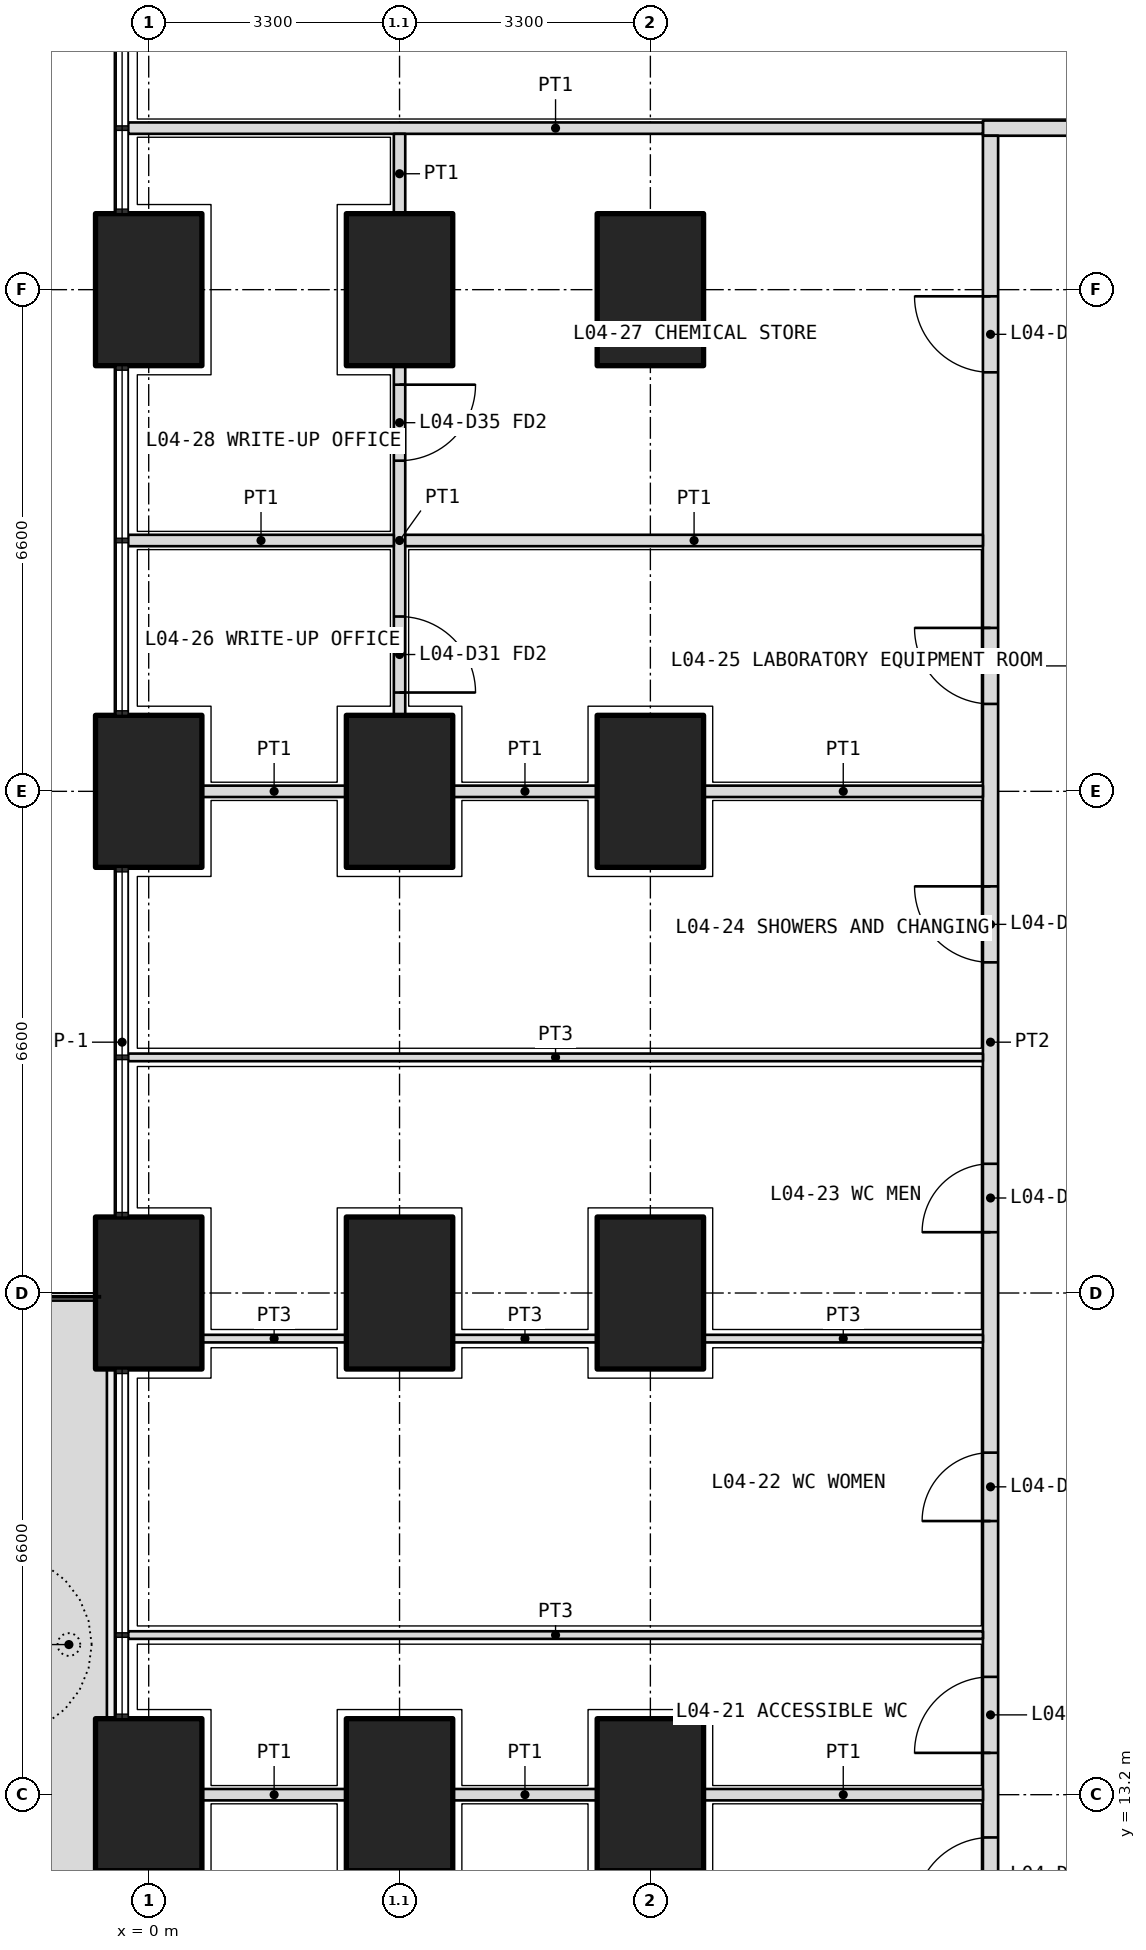
"""IFC4 building model, lengths in metres.
Left out: names, types, materials, properties, quantities, classifications, styles, units other than length and angle.
Written with IfcOpenShell. Run it as: python <this file> out.ifc"""

import sys

from ifc_helpers import new_model, si_unit, direction, frame, frame_2d, origin, origin_2d, place, context, subcontext, project, spatial, polyline, rectangle, outline, extrude, element, fill, save


model = new_model("IFC4")
c1 = context("Model", 3, precision=1e-05, world=origin(), true_north=direction((0.0, 1.0)))
c2 = subcontext(c1, "Body", "Model", "MODEL_VIEW")
j1 = project(units=[si_unit("LENGTHUNIT", "METRE"), si_unit("PLANEANGLEUNIT", "RADIAN")], contexts=[c1])
p1 = place(None, origin())
s1 = spatial("IfcSite", under=j1, at=p1, CompositionType="ELEMENT")
p2 = place(p1, origin())
s2 = spatial("IfcBuilding", under=s1, at=p2, CompositionType="ELEMENT")
p3 = place(p2, frame((0.0, 0.0, 21.3)))
s3 = spatial("IfcBuildingStorey", under=s2, at=p3, CompositionType="ELEMENT", Elevation=21.3)
for number, where, z_axis, x_axis in (
    (1, (0.0, 13.2, 0.0), (0.0, 0.0, 1.0), (0.0, 1.0, 0.0)),
    (2, (0.0, 19.8, 0.0), (0.0, 0.0, 1.0), (0.0, 1.0, 0.0)),
    (3, (0.0, 26.4, 0.0), (0.0, 0.0, 1.0), (0.0, 1.0, 0.0)),
    (4, (0.0, 33.0, 0.0), (0.0, 0.0, 1.0), (0.0, 1.0, 0.0)),
    (5, (3.3, 13.2, 0.0), (0.0, 0.0, 1.0), (0.0, 1.0, 0.0)),
    (6, (3.3, 19.8, 0.0), (0.0, 0.0, 1.0), (0.0, 1.0, 0.0)),
    (7, (3.3, 26.4, 0.0), (0.0, 0.0, 1.0), (0.0, 1.0, 0.0)),
    (8, (3.3, 33.0, 0.0), (0.0, 0.0, 1.0), (0.0, 1.0, 0.0)),
    (9, (6.6, 13.2, 0.0), (0.0, 0.0, 1.0), (0.0, 1.0, 0.0)),
    (10, (6.6, 19.8, 0.0), (0.0, 0.0, 1.0), (0.0, 1.0, 0.0)),
    (11, (6.6, 26.4, 0.0), (0.0, 0.0, 1.0), (0.0, 1.0, 0.0)),
    (12, (6.6, 33.0, 0.0), (0.0, 0.0, 1.0), (0.0, 1.0, 0.0)),
):
    element("IfcColumn", number, at=place(p3, frame(where, z_axis=z_axis, x_axis=x_axis)), inside=s3, PredefinedType="COLUMN", context=c2, shape_type="SweptSolid", body=[
        extrude(rectangle(XDim=2.0, YDim=1.4, at=origin_2d()), origin(), (0.0, 0.0, 1.0), 4.2),
    ])
p4 = place(p3, origin())
e13 = element("IfcWall", 13, at=p4, inside=s3, PredefinedType="USERDEFINED", context=c2, shape_type="SweptSolid", body=[
    extrude(outline(polyline([(-1.55, 10.65), (-0.55, 10.65), (-0.55, 19.7), (-1.55, 19.7), (-1.55, 10.65)]), holes=[polyline([(-1.4, 10.8), (-0.7, 10.8), (-0.7, 19.55), (-1.4, 19.55), (-1.4, 10.8)])]), origin(), (0.0, 0.0, 1.0), 1.05),
])
p5 = place(p3, frame((-0.35, 12.2, 0.0), z_axis=(0.0, 0.0, 1.0), x_axis=(0.0, -1.0, 0.0)))
e14 = element("IfcWall", 14, at=p5, inside=s3, PredefinedType="SOLIDWALL", context=c2, shape_type="SweptSolid", body=[
    extrude(rectangle(XDim=4.6, YDim=0.15, at=frame_2d((2.3, 0.0))), origin(), (0.0, 0.0, 1.0), 2.7),
])
p6 = place(p5, frame((1.05, 0.0, 0.0)))
e15 = element("IfcOpeningElement", 15, at=p6, cuts=e14, PredefinedType="OPENING", context=c2, shape_type="SweptSolid", body=[
    extrude(rectangle(XDim=1.0, YDim=2.4, at=frame_2d((0.5, 1.2))), frame((0.0, 0.085, 0.0), z_axis=(0.0, -1.0, 0.0), x_axis=(1.0, 0.0, 0.0)), (0.0, 0.0, 1.0), 0.17),
])
p7 = place(p5, frame((0.1, 0.0, 0.1)))
e16 = element("IfcOpeningElement", 16, at=p7, cuts=e14, PredefinedType="OPENING", context=c2, shape_type="SweptSolid", body=[
    extrude(rectangle(XDim=0.85, YDim=2.3, at=frame_2d((0.425, 1.15))), frame((0.0, 0.085, 0.0), z_axis=(0.0, -1.0, 0.0), x_axis=(1.0, 0.0, 0.0)), (0.0, 0.0, 1.0), 0.17),
])
p8 = place(p5, frame((2.55, 0.0, 0.1)))
e17 = element("IfcOpeningElement", 17, at=p8, cuts=e14, PredefinedType="OPENING", context=c2, shape_type="SweptSolid", body=[
    extrude(rectangle(XDim=1.95, YDim=2.3, at=frame_2d((0.975, 1.15))), frame((0.0, 0.085, 0.0), z_axis=(0.0, -1.0, 0.0), x_axis=(1.0, 0.0, 0.0)), (0.0, 0.0, 1.0), 0.17),
])
p9 = place(p3, frame((10.975, 35.125, 0.0), z_axis=(0.0, 0.0, 1.0), x_axis=(1.0, 0.0, 0.0)))
e18 = element("IfcWall", 18, at=p9, inside=s3, PredefinedType="PARTITIONING", context=c2, shape_type="SweptSolid", body=[
    extrude(rectangle(XDim=30.85, YDim=0.2, at=frame_2d((15.425, 0.0))), origin(), (0.0, 0.0, 1.0), 2.85),
])
p10 = place(p9, frame((7.262, 0.0, 0.0)))
e19 = element("IfcOpeningElement", 19, at=p10, cuts=e18, PredefinedType="OPENING", context=c2, shape_type="SweptSolid", body=[
    extrude(rectangle(XDim=1.0, YDim=2.1, at=frame_2d((0.5, 1.05))), frame((0.0, 0.11, 0.0), z_axis=(0.0, -1.0, 0.0), x_axis=(1.0, 0.0, 0.0)), (0.0, 0.0, 1.0), 0.22),
])
p11 = place(p9, frame((22.587, 0.0, 0.0)))
e20 = element("IfcOpeningElement", 20, at=p11, cuts=e18, PredefinedType="OPENING", context=c2, shape_type="SweptSolid", body=[
    extrude(rectangle(XDim=1.0, YDim=2.1, at=frame_2d((0.5, 1.05))), frame((0.0, 0.11, 0.0), z_axis=(0.0, -1.0, 0.0), x_axis=(1.0, 0.0, 0.0)), (0.0, 0.0, 1.0), 0.22),
])
p12 = place(p3, frame((11.075, 11.175, 0.0), z_axis=(0.0, 0.0, 1.0), x_axis=(0.0, 1.0, 0.0)))
e21 = element("IfcWall", 21, at=p12, inside=s3, PredefinedType="PARTITIONING", context=c2, shape_type="SweptSolid", body=[
    extrude(rectangle(XDim=23.85, YDim=0.2, at=frame_2d((11.925, 0.0))), origin(), (0.0, 0.0, 1.0), 2.85),
])
p13 = place(p12, frame((0.462, 0.0, 0.0)))
e22 = element("IfcOpeningElement", 22, at=p13, cuts=e21, PredefinedType="OPENING", context=c2, shape_type="SweptSolid", body=[
    extrude(rectangle(XDim=1.0, YDim=2.1, at=frame_2d((0.5, 1.05))), frame((0.0, 0.11, 0.0), z_axis=(0.0, -1.0, 0.0), x_axis=(1.0, 0.0, 0.0)), (0.0, 0.0, 1.0), 0.22),
])
p14 = place(p12, frame((2.575, 0.0, 0.0)))
e23 = element("IfcOpeningElement", 23, at=p14, cuts=e21, PredefinedType="OPENING", context=c2, shape_type="SweptSolid", body=[
    extrude(rectangle(XDim=1.0, YDim=2.1, at=frame_2d((0.5, 1.05))), frame((0.0, 0.11, 0.0), z_axis=(0.0, -1.0, 0.0), x_axis=(1.0, 0.0, 0.0)), (0.0, 0.0, 1.0), 0.22),
])
p15 = place(p12, frame((5.625, 0.0, 0.0)))
e24 = element("IfcOpeningElement", 24, at=p15, cuts=e21, PredefinedType="OPENING", context=c2, shape_type="SweptSolid", body=[
    extrude(rectangle(XDim=0.9, YDim=2.1, at=frame_2d((0.45, 1.05))), frame((0.0, 0.11, 0.0), z_axis=(0.0, -1.0, 0.0), x_axis=(1.0, 0.0, 0.0)), (0.0, 0.0, 1.0), 0.22),
])
p16 = place(p12, frame((9.425, 0.0, 0.0)))
e25 = element("IfcOpeningElement", 25, at=p16, cuts=e21, PredefinedType="OPENING", context=c2, shape_type="SweptSolid", body=[
    extrude(rectangle(XDim=0.9, YDim=2.1, at=frame_2d((0.45, 1.05))), frame((0.0, 0.11, 0.0), z_axis=(0.0, -1.0, 0.0), x_axis=(1.0, 0.0, 0.0)), (0.0, 0.0, 1.0), 0.22),
])
p17 = place(p12, frame((12.975, 0.0, 0.0)))
e26 = element("IfcOpeningElement", 26, at=p17, cuts=e21, PredefinedType="OPENING", context=c2, shape_type="SweptSolid", body=[
    extrude(rectangle(XDim=1.0, YDim=2.1, at=frame_2d((0.5, 1.05))), frame((0.0, 0.11, 0.0), z_axis=(0.0, -1.0, 0.0), x_axis=(1.0, 0.0, 0.0)), (0.0, 0.0, 1.0), 0.22),
])
p18 = place(p12, frame((16.375, 0.0, 0.0)))
e27 = element("IfcOpeningElement", 27, at=p18, cuts=e21, PredefinedType="OPENING", context=c2, shape_type="SweptSolid", body=[
    extrude(rectangle(XDim=1.0, YDim=2.1, at=frame_2d((0.5, 1.05))), frame((0.0, 0.11, 0.0), z_axis=(0.0, -1.0, 0.0), x_axis=(1.0, 0.0, 0.0)), (0.0, 0.0, 1.0), 0.22),
])
p19 = place(p12, frame((20.738, 0.0, 0.0)))
e28 = element("IfcOpeningElement", 28, at=p19, cuts=e21, PredefinedType="OPENING", context=c2, shape_type="SweptSolid", body=[
    extrude(rectangle(XDim=1.0, YDim=2.1, at=frame_2d((0.5, 1.05))), frame((0.0, 0.11, 0.0), z_axis=(0.0, -1.0, 0.0), x_axis=(1.0, 0.0, 0.0)), (0.0, 0.0, 1.0), 0.22),
])
p20 = place(p3, frame((-0.27, 35.125, 0.0), z_axis=(0.0, 0.0, 1.0), x_axis=(1.0, 0.0, 0.0)))
e29 = element("IfcWall", 29, at=p20, inside=s3, PredefinedType="PARTITIONING", context=c2, shape_type="SweptSolid", body=[
    extrude(rectangle(XDim=11.245, YDim=0.15, at=frame_2d((5.623, 0.0))), origin(), (0.0, 0.0, 1.0), 2.7),
])
p21 = place(p3, frame((3.3, 35.05, 0.0), z_axis=(0.0, 0.0, 1.0), x_axis=(0.0, -1.0, 0.0)))
e30 = element("IfcWall", 30, at=p21, inside=s3, PredefinedType="PARTITIONING", context=c2, shape_type="SweptSolid", body=[
    extrude(rectangle(XDim=1.05, YDim=0.15, at=frame_2d((0.525, 0.0))), origin(), (0.0, 0.0, 1.0), 3.9),
])
p22 = place(p3, frame((3.3, 32.0, 0.0), z_axis=(0.0, 0.0, 1.0), x_axis=(0.0, -1.0, 0.0)))
e31 = element("IfcWall", 31, at=p22, inside=s3, PredefinedType="PARTITIONING", context=c2, shape_type="SweptSolid", body=[
    extrude(rectangle(XDim=4.6, YDim=0.15, at=frame_2d((2.3, 0.0))), origin(), (0.0, 0.0, 1.0), 3.9),
])
p23 = place(p22, frame((3.3, 0.0, 0.0)))
e32 = element("IfcOpeningElement", 32, at=p23, cuts=e31, PredefinedType="OPENING", context=c2, shape_type="SweptSolid", body=[
    extrude(rectangle(XDim=1.0, YDim=2.1, at=frame_2d((0.5, 1.05))), frame((0.0, 0.085, 0.0), z_axis=(0.0, -1.0, 0.0), x_axis=(1.0, 0.0, 0.0)), (0.0, 0.0, 1.0), 0.17),
])
p24 = place(p22, frame((0.25, 0.0, 0.0)))
e33 = element("IfcOpeningElement", 33, at=p24, cuts=e31, PredefinedType="OPENING", context=c2, shape_type="SweptSolid", body=[
    extrude(rectangle(XDim=1.0, YDim=2.1, at=frame_2d((0.5, 1.05))), frame((0.0, 0.085, 0.0), z_axis=(0.0, -1.0, 0.0), x_axis=(1.0, 0.0, 0.0)), (0.0, 0.0, 1.0), 0.17),
])
p25 = place(p3, frame((3.3, 12.2, 0.0), z_axis=(0.0, 0.0, 1.0), x_axis=(0.0, -1.0, 0.0)))
e34 = element("IfcWall", 34, at=p25, inside=s3, PredefinedType="PARTITIONING", context=c2, shape_type="SweptSolid", body=[
    extrude(rectangle(XDim=4.6, YDim=0.15, at=frame_2d((2.3, 0.0))), origin(), (0.0, 0.0, 1.0), 3.9),
])
p26 = place(p25, frame((3.35, 0.0, 0.0)))
e35 = element("IfcOpeningElement", 35, at=p26, cuts=e34, PredefinedType="OPENING", context=c2, shape_type="SweptSolid", body=[
    extrude(rectangle(XDim=1.0, YDim=2.1, at=frame_2d((0.5, 1.05))), frame((0.0, 0.085, 0.0), z_axis=(0.0, -1.0, 0.0), x_axis=(1.0, 0.0, 0.0)), (0.0, 0.0, 1.0), 0.17),
])
p27 = place(p3, frame((-0.27, 15.3, 0.0), z_axis=(0.0, 0.0, 1.0), x_axis=(1.0, 0.0, 0.0)))
e36 = element("IfcWall", 36, at=p27, inside=s3, PredefinedType="PARTITIONING", context=c2, shape_type="SweptSolid", body=[
    extrude(rectangle(XDim=11.245, YDim=0.1, at=frame_2d((5.623, 0.0))), origin(), (0.0, 0.0, 1.0), 2.7),
])
p28 = place(p3, frame((0.7, 19.2, 0.0), z_axis=(0.0, 0.0, 1.0), x_axis=(1.0, 0.0, 0.0)))
e37 = element("IfcWall", 37, at=p28, inside=s3, PredefinedType="PARTITIONING", context=c2, shape_type="SweptSolid", body=[
    extrude(rectangle(XDim=1.9, YDim=0.1, at=frame_2d((0.95, 0.0))), origin(), (0.0, 0.0, 1.0), 2.85),
])
p29 = place(p3, frame((4.0, 19.2, 0.0), z_axis=(0.0, 0.0, 1.0), x_axis=(1.0, 0.0, 0.0)))
e38 = element("IfcWall", 38, at=p29, inside=s3, PredefinedType="PARTITIONING", context=c2, shape_type="SweptSolid", body=[
    extrude(rectangle(XDim=1.9, YDim=0.1, at=frame_2d((0.95, 0.0))), origin(), (0.0, 0.0, 1.0), 2.85),
])
p30 = place(p3, frame((7.3, 19.2, 0.0), z_axis=(0.0, 0.0, 1.0), x_axis=(1.0, 0.0, 0.0)))
e39 = element("IfcWall", 39, at=p30, inside=s3, PredefinedType="PARTITIONING", context=c2, shape_type="SweptSolid", body=[
    extrude(rectangle(XDim=3.675, YDim=0.1, at=frame_2d((1.837, 0.0))), origin(), (0.0, 0.0, 1.0), 2.85),
])
p31 = place(p3, frame((-0.27, 22.9, 0.0), z_axis=(0.0, 0.0, 1.0), x_axis=(1.0, 0.0, 0.0)))
e40 = element("IfcWall", 40, at=p31, inside=s3, PredefinedType="PARTITIONING", context=c2, shape_type="SweptSolid", body=[
    extrude(rectangle(XDim=11.245, YDim=0.1, at=frame_2d((5.623, 0.0))), origin(), (0.0, 0.0, 1.0), 2.7),
])
p32 = place(p3, frame((0.7, 13.2, 0.0), z_axis=(0.0, 0.0, 1.0), x_axis=(1.0, 0.0, 0.0)))
e41 = element("IfcWall", 41, at=p32, inside=s3, PredefinedType="PARTITIONING", context=c2, shape_type="SweptSolid", body=[
    extrude(rectangle(XDim=1.9, YDim=0.15, at=frame_2d((0.95, 0.0))), origin(), (0.0, 0.0, 1.0), 2.85),
])
p33 = place(p3, frame((4.0, 13.2, 0.0), z_axis=(0.0, 0.0, 1.0), x_axis=(1.0, 0.0, 0.0)))
e42 = element("IfcWall", 42, at=p33, inside=s3, PredefinedType="PARTITIONING", context=c2, shape_type="SweptSolid", body=[
    extrude(rectangle(XDim=1.9, YDim=0.15, at=frame_2d((0.95, 0.0))), origin(), (0.0, 0.0, 1.0), 2.85),
])
p34 = place(p3, frame((7.3, 13.2, 0.0), z_axis=(0.0, 0.0, 1.0), x_axis=(1.0, 0.0, 0.0)))
e43 = element("IfcWall", 43, at=p34, inside=s3, PredefinedType="PARTITIONING", context=c2, shape_type="SweptSolid", body=[
    extrude(rectangle(XDim=3.675, YDim=0.15, at=frame_2d((1.837, 0.0))), origin(), (0.0, 0.0, 1.0), 2.85),
])
p35 = place(p3, frame((0.7, 26.4, 0.0), z_axis=(0.0, 0.0, 1.0), x_axis=(1.0, 0.0, 0.0)))
e44 = element("IfcWall", 44, at=p35, inside=s3, PredefinedType="PARTITIONING", context=c2, shape_type="SweptSolid", body=[
    extrude(rectangle(XDim=1.9, YDim=0.15, at=frame_2d((0.95, 0.0))), origin(), (0.0, 0.0, 1.0), 2.85),
])
p36 = place(p3, frame((4.0, 26.4, 0.0), z_axis=(0.0, 0.0, 1.0), x_axis=(1.0, 0.0, 0.0)))
e45 = element("IfcWall", 45, at=p36, inside=s3, PredefinedType="PARTITIONING", context=c2, shape_type="SweptSolid", body=[
    extrude(rectangle(XDim=1.9, YDim=0.15, at=frame_2d((0.95, 0.0))), origin(), (0.0, 0.0, 1.0), 2.85),
])
p37 = place(p3, frame((7.3, 26.4, 0.0), z_axis=(0.0, 0.0, 1.0), x_axis=(1.0, 0.0, 0.0)))
e46 = element("IfcWall", 46, at=p37, inside=s3, PredefinedType="PARTITIONING", context=c2, shape_type="SweptSolid", body=[
    extrude(rectangle(XDim=3.675, YDim=0.15, at=frame_2d((1.837, 0.0))), origin(), (0.0, 0.0, 1.0), 2.85),
])
p38 = place(p3, frame((-0.27, 29.7, 0.0), z_axis=(0.0, 0.0, 1.0), x_axis=(1.0, 0.0, 0.0)))
e47 = element("IfcWall", 47, at=p38, inside=s3, PredefinedType="PARTITIONING", context=c2, shape_type="SweptSolid", body=[
    extrude(rectangle(XDim=3.495, YDim=0.15, at=frame_2d((1.748, 0.0))), origin(), (0.0, 0.0, 1.0), 2.7),
])
p39 = place(p3, frame((3.375, 29.7, 0.0), z_axis=(0.0, 0.0, 1.0), x_axis=(1.0, 0.0, 0.0)))
e48 = element("IfcWall", 48, at=p39, inside=s3, PredefinedType="PARTITIONING", context=c2, shape_type="SweptSolid", body=[
    extrude(rectangle(XDim=7.6, YDim=0.15, at=frame_2d((3.8, 0.0))), origin(), (0.0, 0.0, 1.0), 3.9),
])
p40 = place(p13, origin())
e49 = element("IfcDoor", 49, at=p40, inside=s3, OperationType="SINGLE_SWING_LEFT", PredefinedType="DOOR", context=c2, shape_type="SweptSolid", body=[
    extrude(rectangle(XDim=1.0, YDim=2.1, at=frame_2d((0.5, 1.05))), frame((0.0, 0.025, 0.0), z_axis=(0.0, -1.0, 0.0), x_axis=(1.0, 0.0, 0.0)), (0.0, 0.0, 1.0), 0.05),
])
fill(e22, e49)
p41 = place(p14, origin())
e50 = element("IfcDoor", 50, at=p41, inside=s3, OperationType="SINGLE_SWING_LEFT", PredefinedType="DOOR", context=c2, shape_type="SweptSolid", body=[
    extrude(rectangle(XDim=1.0, YDim=2.1, at=frame_2d((0.5, 1.05))), frame((0.0, 0.025, 0.0), z_axis=(0.0, -1.0, 0.0), x_axis=(1.0, 0.0, 0.0)), (0.0, 0.0, 1.0), 0.05),
])
fill(e23, e50)
p42 = place(p15, origin())
e51 = element("IfcDoor", 51, at=p42, inside=s3, OperationType="SINGLE_SWING_LEFT", PredefinedType="DOOR", context=c2, shape_type="SweptSolid", body=[
    extrude(rectangle(XDim=0.9, YDim=2.1, at=frame_2d((0.45, 1.05))), frame((0.0, 0.025, 0.0), z_axis=(0.0, -1.0, 0.0), x_axis=(1.0, 0.0, 0.0)), (0.0, 0.0, 1.0), 0.05),
])
fill(e24, e51)
p43 = place(p16, origin())
e52 = element("IfcDoor", 52, at=p43, inside=s3, OperationType="SINGLE_SWING_LEFT", PredefinedType="DOOR", context=c2, shape_type="SweptSolid", body=[
    extrude(rectangle(XDim=0.9, YDim=2.1, at=frame_2d((0.45, 1.05))), frame((0.0, 0.025, 0.0), z_axis=(0.0, -1.0, 0.0), x_axis=(1.0, 0.0, 0.0)), (0.0, 0.0, 1.0), 0.05),
])
fill(e25, e52)
p44 = place(p17, origin())
e53 = element("IfcDoor", 53, at=p44, inside=s3, OperationType="SINGLE_SWING_RIGHT", PredefinedType="DOOR", context=c2, shape_type="SweptSolid", body=[
    extrude(rectangle(XDim=1.0, YDim=2.1, at=frame_2d((0.5, 1.05))), frame((0.0, 0.025, 0.0), z_axis=(0.0, -1.0, 0.0), x_axis=(1.0, 0.0, 0.0)), (0.0, 0.0, 1.0), 0.05),
])
fill(e26, e53)
p45 = place(p18, origin())
e54 = element("IfcDoor", 54, at=p45, inside=s3, OperationType="SINGLE_SWING_RIGHT", PredefinedType="DOOR", context=c2, shape_type="SweptSolid", body=[
    extrude(rectangle(XDim=1.0, YDim=2.1, at=frame_2d((0.5, 1.05))), frame((0.0, 0.025, 0.0), z_axis=(0.0, -1.0, 0.0), x_axis=(1.0, 0.0, 0.0)), (0.0, 0.0, 1.0), 0.05),
])
fill(e27, e54)
p46 = place(p23, origin())
e55 = element("IfcDoor", 55, at=p46, inside=s3, OperationType="SINGLE_SWING_RIGHT", PredefinedType="DOOR", context=c2, shape_type="SweptSolid", body=[
    extrude(rectangle(XDim=1.0, YDim=2.1, at=frame_2d((0.5, 1.05))), frame((0.0, 0.025, 0.0), z_axis=(0.0, -1.0, 0.0), x_axis=(1.0, 0.0, 0.0)), (0.0, 0.0, 1.0), 0.05),
])
fill(e32, e55)
p47 = place(p19, origin())
e56 = element("IfcDoor", 56, at=p47, inside=s3, OperationType="SINGLE_SWING_RIGHT", PredefinedType="DOOR", context=c2, shape_type="SweptSolid", body=[
    extrude(rectangle(XDim=1.0, YDim=2.1, at=frame_2d((0.5, 1.05))), frame((0.0, 0.025, 0.0), z_axis=(0.0, -1.0, 0.0), x_axis=(1.0, 0.0, 0.0)), (0.0, 0.0, 1.0), 0.05),
])
fill(e28, e56)
p48 = place(p24, origin())
e57 = element("IfcDoor", 57, at=p48, inside=s3, OperationType="SINGLE_SWING_LEFT", PredefinedType="DOOR", context=c2, shape_type="SweptSolid", body=[
    extrude(rectangle(XDim=1.0, YDim=2.1, at=frame_2d((0.5, 1.05))), frame((0.0, 0.025, 0.0), z_axis=(0.0, -1.0, 0.0), x_axis=(1.0, 0.0, 0.0)), (0.0, 0.0, 1.0), 0.05),
])
fill(e33, e57)
save(model, sys.argv[1])
